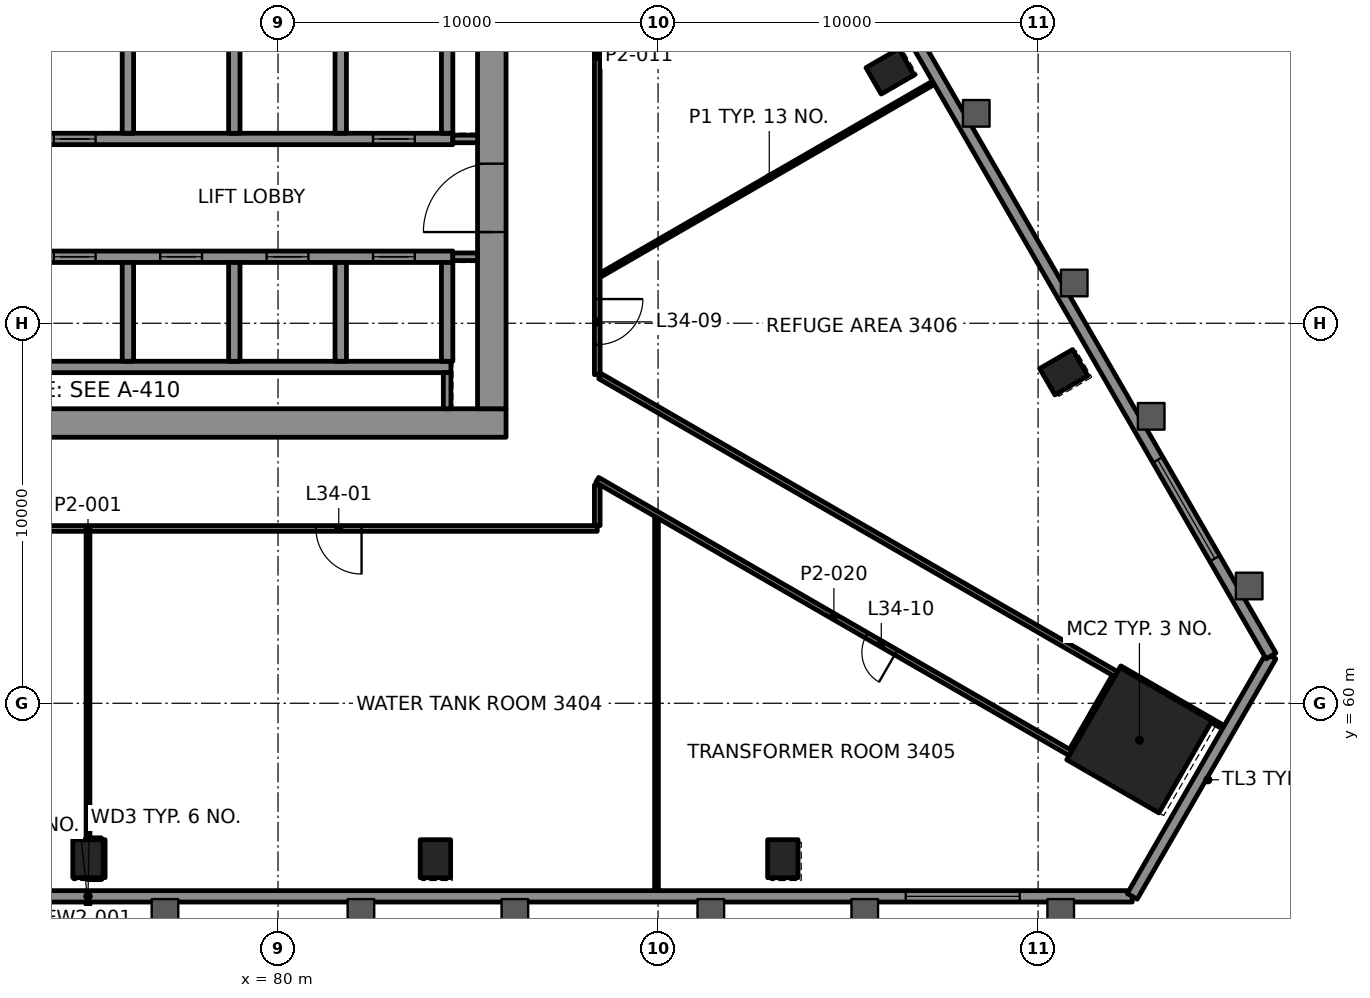
"""IFC4 building model, lengths in metres.
Left out: names, types, materials, properties, quantities, classifications, styles, units other than length and angle.
Written with IfcOpenShell. Run it as: python <this file> out.ifc"""

import sys

from ifc_helpers import new_model, si_unit, direction, frame, frame_2d, origin, origin_2d, place, context, subcontext, project, spatial, rectangle, hollow_rectangle, extrude, element, fill, save


model = new_model("IFC4")
c1 = context("Model", 3, precision=1e-05, world=origin(), true_north=direction((0.0, 1.0)))
c2 = subcontext(c1, "Body", "Model", "MODEL_VIEW")
j1 = project(units=[si_unit("LENGTHUNIT", "METRE"), si_unit("PLANEANGLEUNIT", "RADIAN")], contexts=[c1])
p1 = place(None, origin())
s1 = spatial("IfcSite", under=j1, at=p1, CompositionType="ELEMENT")
p2 = place(p1, origin())
s2 = spatial("IfcBuilding", under=s1, at=p2, CompositionType="ELEMENT")
p3 = place(p2, frame((0.0, 0.0, 151.3)))
s3 = spatial("IfcBuildingStorey", under=s2, at=p3, CompositionType="ELEMENT", Elevation=151.3)
p4 = place(p3, frame((102.666, 59.027, 0.0), z_axis=(0.0, 0.0, 1.0), x_axis=(0.5, 0.866025403784, 0.0)))
e1 = element("IfcColumn", 1, at=p4, inside=s3, PredefinedType="COLUMN", context=c2, shape_type="SweptSolid", body=[
    extrude(rectangle(XDim=2.8, YDim=2.8, at=origin_2d()), origin(), (0.0, 0.0, 1.0), 4.5),
])
for number, where, z_axis, x_axis in (
    (2, (75.0, 55.909, -0.0), (0.0, 0.0, 1.0), (1.0, 0.0, 0.0)),
    (3, (84.142, 55.909, -0.0), (0.0, 0.0, 1.0), (1.0, 0.0, 0.0)),
    (4, (93.283, 55.909, -0.0), (0.0, 0.0, 1.0), (1.0, 0.0, 0.0)),
    (5, (100.675, 68.711, -0.0), (0.0, 0.0, 1.0), (-0.5, 0.866, 0.0)),
    (6, (96.104, 76.628, -0.0), (0.0, 0.0, 1.0), (-0.5, 0.866, 0.0)),
):
    element("IfcColumn", number, at=place(p3, frame(where, z_axis=z_axis, x_axis=x_axis)), inside=s3, PredefinedType="COLUMN", context=c2, shape_type="SweptSolid", body=[
        extrude(hollow_rectangle(XDim=0.8, YDim=1.0, WallThickness=0.05, at=origin_2d()), origin(), (0.0, 0.0, 1.0), 4.5),
    ])
p5 = place(p3, frame((64.0, 67.375, 0.0), z_axis=(0.0, 0.0, 1.0), x_axis=(1.0, 0.0, 0.0)))
e7 = element("IfcWall", 7, at=p5, inside=s3, PredefinedType="SHEAR", context=c2, shape_type="SweptSolid", body=[
    extrude(rectangle(XDim=22.0, YDim=0.75, at=frame_2d((11.0, 0.0))), origin(), (0.0, 0.0, 1.0), 4.3),
])
p6 = place(p5, frame((3.15, 0.0, 0.0)))
e8 = element("IfcOpeningElement", 8, at=p6, cuts=e7, PredefinedType="OPENING", context=c2, shape_type="SweptSolid", body=[
    extrude(rectangle(XDim=0.9, YDim=2.1, at=frame_2d((0.45, 1.05))), frame((0.0, 0.385, 0.0), z_axis=(0.0, -1.0, 0.0), x_axis=(1.0, 0.0, 0.0)), (0.0, 0.0, 1.0), 0.77),
])
p7 = place(p3, frame((85.625, 67.75, 0.0), z_axis=(0.0, 0.0, 1.0), x_axis=(0.0, 1.0, 0.0)))
e9 = element("IfcWall", 9, at=p7, inside=s3, PredefinedType="SHEAR", context=c2, shape_type="SweptSolid", body=[
    extrude(rectangle(XDim=14.5, YDim=0.75, at=frame_2d((7.25, 0.0))), origin(), (0.0, 0.0, 1.0), 4.3),
])
p8 = place(p7, frame((4.65, 0.0, 0.0)))
e10 = element("IfcOpeningElement", 10, at=p8, cuts=e9, PredefinedType="OPENING", context=c2, shape_type="SweptSolid", body=[
    extrude(rectangle(XDim=1.8, YDim=2.1, at=frame_2d((0.9, 1.05))), frame((0.0, 0.385, 0.0), z_axis=(0.0, -1.0, 0.0), x_axis=(1.0, 0.0, 0.0)), (0.0, 0.0, 1.0), 0.77),
])
p9 = place(p7, frame((11.8, 0.0, 0.0)))
e11 = element("IfcOpeningElement", 11, at=p9, cuts=e9, PredefinedType="OPENING", context=c2, shape_type="SweptSolid", body=[
    extrude(rectangle(XDim=0.9, YDim=2.1, at=frame_2d((0.45, 1.05))), frame((0.0, 0.385, 0.0), z_axis=(0.0, -1.0, 0.0), x_axis=(1.0, 0.0, 0.0)), (0.0, 0.0, 1.0), 0.77),
])
p10 = place(p3, frame((70.35, 68.85, 0.0), z_axis=(0.0, 0.0, 1.0), x_axis=(1.0, 0.0, 0.0)))
e12 = element("IfcWall", 12, at=p10, inside=s3, PredefinedType="SHEAR", context=c2, shape_type="SweptSolid", body=[
    extrude(rectangle(XDim=14.2, YDim=0.3, at=frame_2d((7.1, 0.0))), origin(), (0.0, 0.0, 1.0), 4.3),
])
p11 = place(p3, frame((70.3, 71.75, 0.0), z_axis=(0.0, 0.0, 1.0), x_axis=(1.0, 0.0, 0.0)))
e13 = element("IfcWall", 13, at=p11, inside=s3, PredefinedType="SHEAR", context=c2, shape_type="SweptSolid", body=[
    extrude(rectangle(XDim=14.3, YDim=0.3, at=frame_2d((7.15, 0.0))), origin(), (0.0, 0.0, 1.0), 4.3),
])
p12 = place(p11, frame((1.0, 0.0, 0.0)))
e14 = element("IfcOpeningElement", 14, at=p12, cuts=e13, PredefinedType="OPENING", context=c2, shape_type="SweptSolid", body=[
    extrude(rectangle(XDim=1.1, YDim=2.1, at=frame_2d((0.55, 1.05))), frame((0.0, 0.16, 0.0), z_axis=(0.0, -1.0, 0.0), x_axis=(1.0, 0.0, 0.0)), (0.0, 0.0, 1.0), 0.32),
])
p13 = place(p11, frame((3.8, 0.0, 0.0)))
e15 = element("IfcOpeningElement", 15, at=p13, cuts=e13, PredefinedType="OPENING", context=c2, shape_type="SweptSolid", body=[
    extrude(rectangle(XDim=1.1, YDim=2.1, at=frame_2d((0.55, 1.05))), frame((0.0, 0.16, 0.0), z_axis=(0.0, -1.0, 0.0), x_axis=(1.0, 0.0, 0.0)), (0.0, 0.0, 1.0), 0.32),
])
p14 = place(p11, frame((6.6, 0.0, 0.0)))
e16 = element("IfcOpeningElement", 16, at=p14, cuts=e13, PredefinedType="OPENING", context=c2, shape_type="SweptSolid", body=[
    extrude(rectangle(XDim=1.1, YDim=2.1, at=frame_2d((0.55, 1.05))), frame((0.0, 0.16, 0.0), z_axis=(0.0, -1.0, 0.0), x_axis=(1.0, 0.0, 0.0)), (0.0, 0.0, 1.0), 0.32),
])
p15 = place(p11, frame((9.4, 0.0, 0.0)))
e17 = element("IfcOpeningElement", 17, at=p15, cuts=e13, PredefinedType="OPENING", context=c2, shape_type="SweptSolid", body=[
    extrude(rectangle(XDim=1.1, YDim=2.1, at=frame_2d((0.55, 1.05))), frame((0.0, 0.16, 0.0), z_axis=(0.0, -1.0, 0.0), x_axis=(1.0, 0.0, 0.0)), (0.0, 0.0, 1.0), 0.32),
])
p16 = place(p11, frame((12.2, 0.0, 0.0)))
e18 = element("IfcOpeningElement", 18, at=p16, cuts=e13, PredefinedType="OPENING", context=c2, shape_type="SweptSolid", body=[
    extrude(rectangle(XDim=1.1, YDim=2.1, at=frame_2d((0.55, 1.05))), frame((0.0, 0.16, 0.0), z_axis=(0.0, -1.0, 0.0), x_axis=(1.0, 0.0, 0.0)), (0.0, 0.0, 1.0), 0.32),
])
p17 = place(p3, frame((70.3, 74.85, 0.0), z_axis=(0.0, 0.0, 1.0), x_axis=(1.0, 0.0, 0.0)))
e19 = element("IfcWall", 19, at=p17, inside=s3, PredefinedType="SHEAR", context=c2, shape_type="SweptSolid", body=[
    extrude(rectangle(XDim=14.3, YDim=0.3, at=frame_2d((7.15, 0.0))), origin(), (0.0, 0.0, 1.0), 4.3),
])
p18 = place(p17, frame((3.8, 0.0, 0.0)))
e20 = element("IfcOpeningElement", 20, at=p18, cuts=e19, PredefinedType="OPENING", context=c2, shape_type="SweptSolid", body=[
    extrude(rectangle(XDim=1.1, YDim=2.1, at=frame_2d((0.55, 1.05))), frame((0.0, 0.16, 0.0), z_axis=(0.0, -1.0, 0.0), x_axis=(1.0, 0.0, 0.0)), (0.0, 0.0, 1.0), 0.32),
])
p19 = place(p17, frame((12.2, 0.0, 0.0)))
e21 = element("IfcOpeningElement", 21, at=p19, cuts=e19, PredefinedType="OPENING", context=c2, shape_type="SweptSolid", body=[
    extrude(rectangle(XDim=1.1, YDim=2.1, at=frame_2d((0.55, 1.05))), frame((0.0, 0.16, 0.0), z_axis=(0.0, -1.0, 0.0), x_axis=(1.0, 0.0, 0.0)), (0.0, 0.0, 1.0), 0.32),
])
for number, where, z_axis, x_axis in (
    (22, (76.05, 69.0, 0.0), (0.0, 0.0, 1.0), (0.0, 1.0, 0.0)),
    (23, (76.05, 75.0, 0.0), (0.0, 0.0, 1.0), (0.0, 1.0, 0.0)),
    (24, (78.85, 69.0, 0.0), (0.0, 0.0, 1.0), (0.0, 1.0, 0.0)),
    (25, (78.85, 75.0, 0.0), (0.0, 0.0, 1.0), (0.0, 1.0, 0.0)),
    (26, (81.65, 69.0, 0.0), (0.0, 0.0, 1.0), (0.0, 1.0, 0.0)),
    (27, (81.65, 75.0, 0.0), (0.0, 0.0, 1.0), (0.0, 1.0, 0.0)),
    (28, (84.45, 69.0, 0.0), (0.0, 0.0, 1.0), (0.0, 1.0, 0.0)),
    (29, (84.45, 75.0, 0.0), (0.0, 0.0, 1.0), (0.0, 1.0, 0.0)),
):
    element("IfcWall", number, at=place(p3, frame(where, z_axis=z_axis, x_axis=x_axis)), inside=s3, PredefinedType="SHEAR", context=c2, shape_type="SweptSolid", body=[
        extrude(rectangle(XDim=2.6, YDim=0.3, at=frame_2d((1.3, 0.0))), origin(), (0.0, 0.0, 1.0), 4.3),
    ])
p20 = place(p3, frame((75.0, 55.409, 0.0), z_axis=(0.0, 0.0, 1.0), x_axis=(1.0, 0.0, 0.0)))
e30 = element("IfcWall", 30, at=p20, inside=s3, PredefinedType="PARTITIONING", context=c2, shape_type="SweptSolid", body=[
    extrude(rectangle(XDim=0.35, YDim=0.1, at=frame_2d((0.175, 0.0))), origin(), (0.0, 0.0, 1.0), 3.7),
])
p21 = place(p3, frame((75.05, 56.409, 0.0), z_axis=(0.0, 0.0, 1.0), x_axis=(1.0, 0.0, 0.0)))
e31 = element("IfcWall", 31, at=p21, inside=s3, PredefinedType="PARTITIONING", context=c2, shape_type="SweptSolid", body=[
    extrude(rectangle(XDim=0.3, YDim=0.1, at=frame_2d((0.15, 0.0))), origin(), (0.0, 0.0, 1.0), 3.7),
])
p22 = place(p3, frame((88.399, 64.6, 0.0), z_axis=(0.0, 0.0, 1.0), x_axis=(-1.0, 0.0, 0.0)))
e32 = element("IfcWall", 32, at=p22, inside=s3, PredefinedType="PARTITIONING", context=c2, shape_type="SweptSolid", body=[
    extrude(rectangle(XDim=26.799, YDim=0.15, at=frame_2d((13.399, 0.0))), origin(), (0.0, 0.0, 1.0), 3.7),
])
p23 = place(p22, frame((6.201, 0.0, 0.0)))
e33 = element("IfcOpeningElement", 33, at=p23, cuts=e32, PredefinedType="OPENING", context=c2, shape_type="SweptSolid", body=[
    extrude(rectangle(XDim=1.2, YDim=2.1, at=frame_2d((0.6, 1.05))), frame((0.0, 0.085, 0.0), z_axis=(0.0, -1.0, 0.0), x_axis=(1.0, 0.0, 0.0)), (0.0, 0.0, 1.0), 0.17),
])
p24 = place(p22, frame((19.182, 0.0, 0.0)))
e34 = element("IfcOpeningElement", 34, at=p24, cuts=e32, PredefinedType="OPENING", context=c2, shape_type="SweptSolid", body=[
    extrude(rectangle(XDim=0.9, YDim=2.1, at=frame_2d((0.45, 1.05))), frame((0.0, 0.085, 0.0), z_axis=(0.0, -1.0, 0.0), x_axis=(1.0, 0.0, 0.0)), (0.0, 0.0, 1.0), 0.17),
])
p25 = place(p3, frame((88.501, 71.279, 0.0), z_axis=(0.0, 0.0, 1.0), x_axis=(0.866018885385, 0.500011290028, 0.0)))
e35 = element("IfcWall", 35, at=p25, inside=s3, PredefinedType="PARTITIONING", context=c2, shape_type="SweptSolid", body=[
    extrude(rectangle(XDim=10.219, YDim=0.1, at=frame_2d((5.109, 0.0))), origin(), (0.0, 0.0, 1.0), 3.7),
])
p26 = place(p3, frame((100.891, 58.753, 0.0), z_axis=(0.0, 0.0, 1.0), x_axis=(0.500023814363, 0.866011654119, 0.0)))
e36 = element("IfcWall", 36, at=p26, inside=s3, PredefinedType="PARTITIONING", context=c2, shape_type="SweptSolid", body=[
    extrude(rectangle(XDim=2.244, YDim=0.15, at=frame_2d((1.122, 0.0))), origin(), (0.0, 0.0, 1.0), 3.7),
])
p27 = place(p3, frame((89.959, 54.949, 0.0), z_axis=(0.0, 0.0, 1.0), x_axis=(0.0, 1.0, 0.0)))
e37 = element("IfcWall", 37, at=p27, inside=s3, PredefinedType="PARTITIONING", context=c2, shape_type="SweptSolid", body=[
    extrude(rectangle(XDim=9.912, YDim=0.1, at=frame_2d((4.956, 0.0))), origin(), (0.0, 0.0, 1.0), 3.7),
])
p28 = place(p3, frame((88.4, 64.676, 0.0), z_axis=(0.0, 0.0, 1.0), x_axis=(0.0, 1.0, 0.0)))
e38 = element("IfcWall", 38, at=p28, inside=s3, PredefinedType="PARTITIONING", context=c2, shape_type="SweptSolid", body=[
    extrude(rectangle(XDim=1.066, YDim=0.15, at=frame_2d((0.533, 0.0))), origin(), (0.0, 0.0, 1.0), 3.7),
])
p29 = place(p3, frame((88.4, 85.399, 0.0), z_axis=(0.0, 0.0, 1.0), x_axis=(0.0, -1.0, 0.0)))
e39 = element("IfcWall", 39, at=p29, inside=s3, PredefinedType="PARTITIONING", context=c2, shape_type="SweptSolid", body=[
    extrude(rectangle(XDim=16.75, YDim=0.15, at=frame_2d((8.375, 0.0))), origin(), (0.0, 0.0, 1.0), 3.7),
])
p30 = place(p29, frame((14.763, 0.0, 0.0)))
e40 = element("IfcOpeningElement", 40, at=p30, cuts=e39, PredefinedType="OPENING", context=c2, shape_type="SweptSolid", body=[
    extrude(rectangle(XDim=1.2, YDim=2.1, at=frame_2d((0.6, 1.05))), frame((0.0, 0.085, 0.0), z_axis=(0.0, -1.0, 0.0), x_axis=(1.0, 0.0, 0.0)), (0.0, 0.0, 1.0), 0.17),
])
p31 = place(p3, frame((75.4, 55.41, 0.0), z_axis=(0.0, 0.0, 1.0), x_axis=(0.0, 1.0, 0.0)))
e41 = element("IfcWall", 41, at=p31, inside=s3, PredefinedType="PARTITIONING", context=c2, shape_type="SweptSolid", body=[
    extrude(rectangle(XDim=0.999, YDim=0.1, at=frame_2d((0.5, 0.0))), origin(), (0.0, 0.0, 1.0), 3.7),
])
p32 = place(p3, frame((75.0, 56.409, 0.0), z_axis=(0.0, 0.0, 1.0), x_axis=(0.0, 1.0, 0.0)))
e42 = element("IfcWall", 42, at=p32, inside=s3, PredefinedType="PARTITIONING", context=c2, shape_type="SweptSolid", body=[
    extrude(rectangle(XDim=8.116, YDim=0.1, at=frame_2d((4.058, 0.0))), origin(), (0.0, 0.0, 1.0), 3.7),
])
p33 = place(p3, frame((104.977, 59.31, 0.0), z_axis=(0.0, 0.0, 1.0), x_axis=(-0.866035906198, 0.499981808845, 0.0)))
e43 = element("IfcWall", 43, at=p33, inside=s3, PredefinedType="PARTITIONING", context=c2, shape_type="SweptSolid", body=[
    extrude(rectangle(XDim=3.259, YDim=0.1, at=frame_2d((1.63, 0.0))), origin(), (0.0, 0.0, 1.0), 3.7),
])
p34 = place(p3, frame((102.054, 60.766, 0.0), z_axis=(0.0, 0.0, 1.0), x_axis=(-0.866025857359, 0.499999214385, 0.0)))
e44 = element("IfcWall", 44, at=p34, inside=s3, PredefinedType="PARTITIONING", context=c2, shape_type="SweptSolid", body=[
    extrude(rectangle(XDim=15.679, YDim=0.15, at=frame_2d((7.84, 0.0))), origin(), (0.0, 0.0, 1.0), 3.7),
])
p35 = place(p3, frame((100.853, 58.688, 0.0), z_axis=(0.0, 0.0, 1.0), x_axis=(-0.866021599452, 0.500006589238, 0.0)))
e45 = element("IfcWall", 45, at=p35, inside=s3, PredefinedType="PARTITIONING", context=c2, shape_type="SweptSolid", body=[
    extrude(rectangle(XDim=14.38, YDim=0.15, at=frame_2d((7.19, 0.0))), origin(), (0.0, 0.0, 1.0), 3.7),
])
p36 = place(p35, frame((5.3, 0.0, 0.0)))
e46 = element("IfcOpeningElement", 46, at=p36, cuts=e45, PredefinedType="OPENING", context=c2, shape_type="SweptSolid", body=[
    extrude(rectangle(XDim=0.9, YDim=2.1, at=frame_2d((0.45, 1.05))), frame((0.0, 0.085, 0.0), z_axis=(0.0, -1.0, 0.0), x_axis=(1.0, 0.0, 0.0)), (0.0, 0.0, 1.0), 0.17),
])
p37 = place(p3, frame((47.523, 54.919, 0.0), z_axis=(0.0, 0.0, 1.0), x_axis=(1.0, 0.0, 0.0)))
e47 = element("IfcWall", 47, at=p37, inside=s3, PredefinedType="SOLIDWALL", context=c2, shape_type="SweptSolid", body=[
    extrude(rectangle(XDim=54.954, YDim=0.3, at=frame_2d((27.477, 0.0))), origin(), (0.0, 0.0, 1.0), 4.3),
])
p38 = place(p37, frame((2.96, 0.0, 0.8)))
e48 = element("IfcOpeningElement", 48, at=p38, cuts=e47, PredefinedType="OPENING", context=c2, shape_type="SweptSolid", body=[
    extrude(rectangle(XDim=3.0, YDim=2.4, at=frame_2d((1.5, 1.2))), frame((0.0, 0.16, 0.0), z_axis=(0.0, -1.0, 0.0), x_axis=(1.0, 0.0, 0.0)), (0.0, 0.0, 1.0), 0.32),
])
p39 = place(p37, frame((48.994, 0.0, 0.8)))
e49 = element("IfcOpeningElement", 49, at=p39, cuts=e47, PredefinedType="OPENING", context=c2, shape_type="SweptSolid", body=[
    extrude(rectangle(XDim=3.0, YDim=2.4, at=frame_2d((1.5, 1.2))), frame((0.0, 0.16, 0.0), z_axis=(0.0, -1.0, 0.0), x_axis=(1.0, 0.0, 0.0)), (0.0, 0.0, 1.0), 0.32),
])
p40 = place(p3, frame((102.477, 54.919, 0.0), z_axis=(0.0, 0.0, 1.0), x_axis=(0.499985757347, 0.866033626628, 0.0)))
e50 = element("IfcWall", 50, at=p40, inside=s3, PredefinedType="SOLIDWALL", context=c2, shape_type="SweptSolid", body=[
    extrude(rectangle(XDim=7.304, YDim=0.3, at=frame_2d((3.652, 0.0))), origin(), (0.0, 0.0, 1.0), 4.3),
])
p41 = place(p3, frame((106.129, 61.245, 0.0), z_axis=(0.0, 0.0, 1.0), x_axis=(-0.500000750612, 0.866024970418, 0.0)))
e51 = element("IfcWall", 51, at=p41, inside=s3, PredefinedType="SOLIDWALL", context=c2, shape_type="SweptSolid", body=[
    extrude(rectangle(XDim=54.954, YDim=0.3, at=frame_2d((27.477, 0.0))), origin(), (0.0, 0.0, 1.0), 4.3),
])
p42 = place(p41, frame((2.96, 0.0, 0.8)))
e52 = element("IfcOpeningElement", 52, at=p42, cuts=e51, PredefinedType="OPENING", context=c2, shape_type="SweptSolid", body=[
    extrude(rectangle(XDim=3.0, YDim=2.4, at=frame_2d((1.5, 1.2))), frame((0.0, 0.16, 0.0), z_axis=(0.0, -1.0, 0.0), x_axis=(1.0, 0.0, 0.0)), (0.0, 0.0, 1.0), 0.32),
])
p43 = place(p41, frame((48.994, 0.0, 0.8)))
e53 = element("IfcOpeningElement", 53, at=p43, cuts=e51, PredefinedType="OPENING", context=c2, shape_type="SweptSolid", body=[
    extrude(rectangle(XDim=3.0, YDim=2.4, at=frame_2d((1.5, 1.2))), frame((0.0, 0.16, 0.0), z_axis=(0.0, -1.0, 0.0), x_axis=(1.0, 0.0, 0.0)), (0.0, 0.0, 1.0), 0.32),
])
for number, where, z_axis, x_axis in (
    (54, (84.6, 71.75, 0.0), (0.0, 0.0, 1.0), (1.0, 0.0, 0.0)),
    (55, (84.6, 74.85, 0.0), (0.0, 0.0, 1.0), (1.0, 0.0, 0.0)),
):
    element("IfcWall", number, at=place(p3, frame(where, z_axis=z_axis, x_axis=x_axis)), inside=s3, PredefinedType="PARTITIONING", context=c2, shape_type="SweptSolid", body=[
        extrude(rectangle(XDim=0.65, YDim=0.2, at=frame_2d((0.325, 0.0))), origin(), (0.0, 0.0, 1.0), 4.3),
    ])
p44 = place(p3, frame((84.45, 67.75, 0.0), z_axis=(0.0, 0.0, 1.0), x_axis=(0.0, 1.0, 0.0)))
e56 = element("IfcWall", 56, at=p44, inside=s3, PredefinedType="PARTITIONING", context=c2, shape_type="SweptSolid", body=[
    extrude(rectangle(XDim=0.95, YDim=0.2, at=frame_2d((0.475, 0.0))), origin(), (0.0, 0.0, 1.0), 4.3),
])
p45 = place(p23, origin())
e57 = element("IfcDoor", 57, at=p45, inside=s3, OperationType="DOUBLE_DOOR_SINGLE_SWING", PredefinedType="DOOR", context=c2, shape_type="SweptSolid", body=[
    extrude(rectangle(XDim=1.2, YDim=2.1, at=frame_2d((0.6, 1.05))), frame((0.0, 0.025, 0.0), z_axis=(0.0, -1.0, 0.0), x_axis=(1.0, 0.0, 0.0)), (0.0, 0.0, 1.0), 0.05),
])
fill(e33, e57)
p46 = place(p30, origin())
e58 = element("IfcDoor", 58, at=p46, inside=s3, OperationType="DOUBLE_DOOR_SINGLE_SWING", PredefinedType="DOOR", context=c2, shape_type="SweptSolid", body=[
    extrude(rectangle(XDim=1.2, YDim=2.1, at=frame_2d((0.6, 1.05))), frame((0.0, 0.025, 0.0), z_axis=(0.0, -1.0, 0.0), x_axis=(1.0, 0.0, 0.0)), (0.0, 0.0, 1.0), 0.05),
])
fill(e40, e58)
p47 = place(p36, origin())
e59 = element("IfcDoor", 59, at=p47, inside=s3, OperationType="SINGLE_SWING_RIGHT", PredefinedType="DOOR", context=c2, shape_type="SweptSolid", body=[
    extrude(rectangle(XDim=0.9, YDim=2.1, at=frame_2d((0.45, 1.05))), frame((0.0, 0.025, 0.0), z_axis=(0.0, -1.0, 0.0), x_axis=(1.0, 0.0, 0.0)), (0.0, 0.0, 1.0), 0.05),
])
fill(e46, e59)
p48 = place(p39, origin())
e60 = element("IfcWindow", 60, at=p48, inside=s3, PartitioningType="SINGLE_PANEL", PredefinedType="WINDOW", context=c2, shape_type="SweptSolid", body=[
    extrude(rectangle(XDim=3.0, YDim=2.4, at=frame_2d((1.5, 1.2))), frame((0.0, 0.03, 0.0), z_axis=(0.0, -1.0, 0.0), x_axis=(1.0, 0.0, 0.0)), (0.0, 0.0, 1.0), 0.06),
])
fill(e49, e60)
p49 = place(p42, origin())
e61 = element("IfcWindow", 61, at=p49, inside=s3, PartitioningType="SINGLE_PANEL", PredefinedType="WINDOW", context=c2, shape_type="SweptSolid", body=[
    extrude(rectangle(XDim=3.0, YDim=2.4, at=frame_2d((1.5, 1.2))), frame((0.0, 0.03, 0.0), z_axis=(0.0, -1.0, 0.0), x_axis=(1.0, 0.0, 0.0)), (0.0, 0.0, 1.0), 0.06),
])
fill(e52, e61)
p50 = place(p13, origin())
e62 = element("IfcDoor", 62, at=p50, inside=s3, OperationType="DOUBLE_DOOR_SLIDING", PredefinedType="DOOR", context=c2, shape_type="SweptSolid", body=[
    extrude(rectangle(XDim=1.1, YDim=2.1, at=frame_2d((0.55, 1.05))), frame((0.0, 0.025, 0.0), z_axis=(0.0, -1.0, 0.0), x_axis=(1.0, 0.0, 0.0)), (0.0, 0.0, 1.0), 0.05),
])
fill(e15, e62)
p51 = place(p14, origin())
e63 = element("IfcDoor", 63, at=p51, inside=s3, OperationType="DOUBLE_DOOR_SLIDING", PredefinedType="DOOR", context=c2, shape_type="SweptSolid", body=[
    extrude(rectangle(XDim=1.1, YDim=2.1, at=frame_2d((0.55, 1.05))), frame((0.0, 0.025, 0.0), z_axis=(0.0, -1.0, 0.0), x_axis=(1.0, 0.0, 0.0)), (0.0, 0.0, 1.0), 0.05),
])
fill(e16, e63)
p52 = place(p15, origin())
e64 = element("IfcDoor", 64, at=p52, inside=s3, OperationType="DOUBLE_DOOR_SLIDING", PredefinedType="DOOR", context=c2, shape_type="SweptSolid", body=[
    extrude(rectangle(XDim=1.1, YDim=2.1, at=frame_2d((0.55, 1.05))), frame((0.0, 0.025, 0.0), z_axis=(0.0, -1.0, 0.0), x_axis=(1.0, 0.0, 0.0)), (0.0, 0.0, 1.0), 0.05),
])
fill(e17, e64)
p53 = place(p16, origin())
e65 = element("IfcDoor", 65, at=p53, inside=s3, OperationType="DOUBLE_DOOR_SLIDING", PredefinedType="DOOR", context=c2, shape_type="SweptSolid", body=[
    extrude(rectangle(XDim=1.1, YDim=2.1, at=frame_2d((0.55, 1.05))), frame((0.0, 0.025, 0.0), z_axis=(0.0, -1.0, 0.0), x_axis=(1.0, 0.0, 0.0)), (0.0, 0.0, 1.0), 0.05),
])
fill(e18, e65)
p54 = place(p18, origin())
e66 = element("IfcDoor", 66, at=p54, inside=s3, OperationType="DOUBLE_DOOR_SLIDING", PredefinedType="DOOR", context=c2, shape_type="SweptSolid", body=[
    extrude(rectangle(XDim=1.1, YDim=2.1, at=frame_2d((0.55, 1.05))), frame((0.0, 0.025, 0.0), z_axis=(0.0, -1.0, 0.0), x_axis=(1.0, 0.0, 0.0)), (0.0, 0.0, 1.0), 0.05),
])
fill(e20, e66)
p55 = place(p19, origin())
e67 = element("IfcDoor", 67, at=p55, inside=s3, OperationType="DOUBLE_DOOR_SLIDING", PredefinedType="DOOR", context=c2, shape_type="SweptSolid", body=[
    extrude(rectangle(XDim=1.1, YDim=2.1, at=frame_2d((0.55, 1.05))), frame((0.0, 0.025, 0.0), z_axis=(0.0, -1.0, 0.0), x_axis=(1.0, 0.0, 0.0)), (0.0, 0.0, 1.0), 0.05),
])
fill(e21, e67)
p56 = place(p8, origin())
e68 = element("IfcDoor", 68, at=p56, inside=s3, OperationType="SINGLE_SWING_RIGHT", PredefinedType="DOOR", context=c2, shape_type="SweptSolid", body=[
    extrude(rectangle(XDim=1.8, YDim=2.1, at=frame_2d((0.9, 1.05))), frame((0.0, 0.095, 0.0), z_axis=(0.0, -1.0, 0.0), x_axis=(1.0, 0.0, 0.0)), (0.0, 0.0, 1.0), 0.19),
])
fill(e10, e68)
save(model, sys.argv[1])
